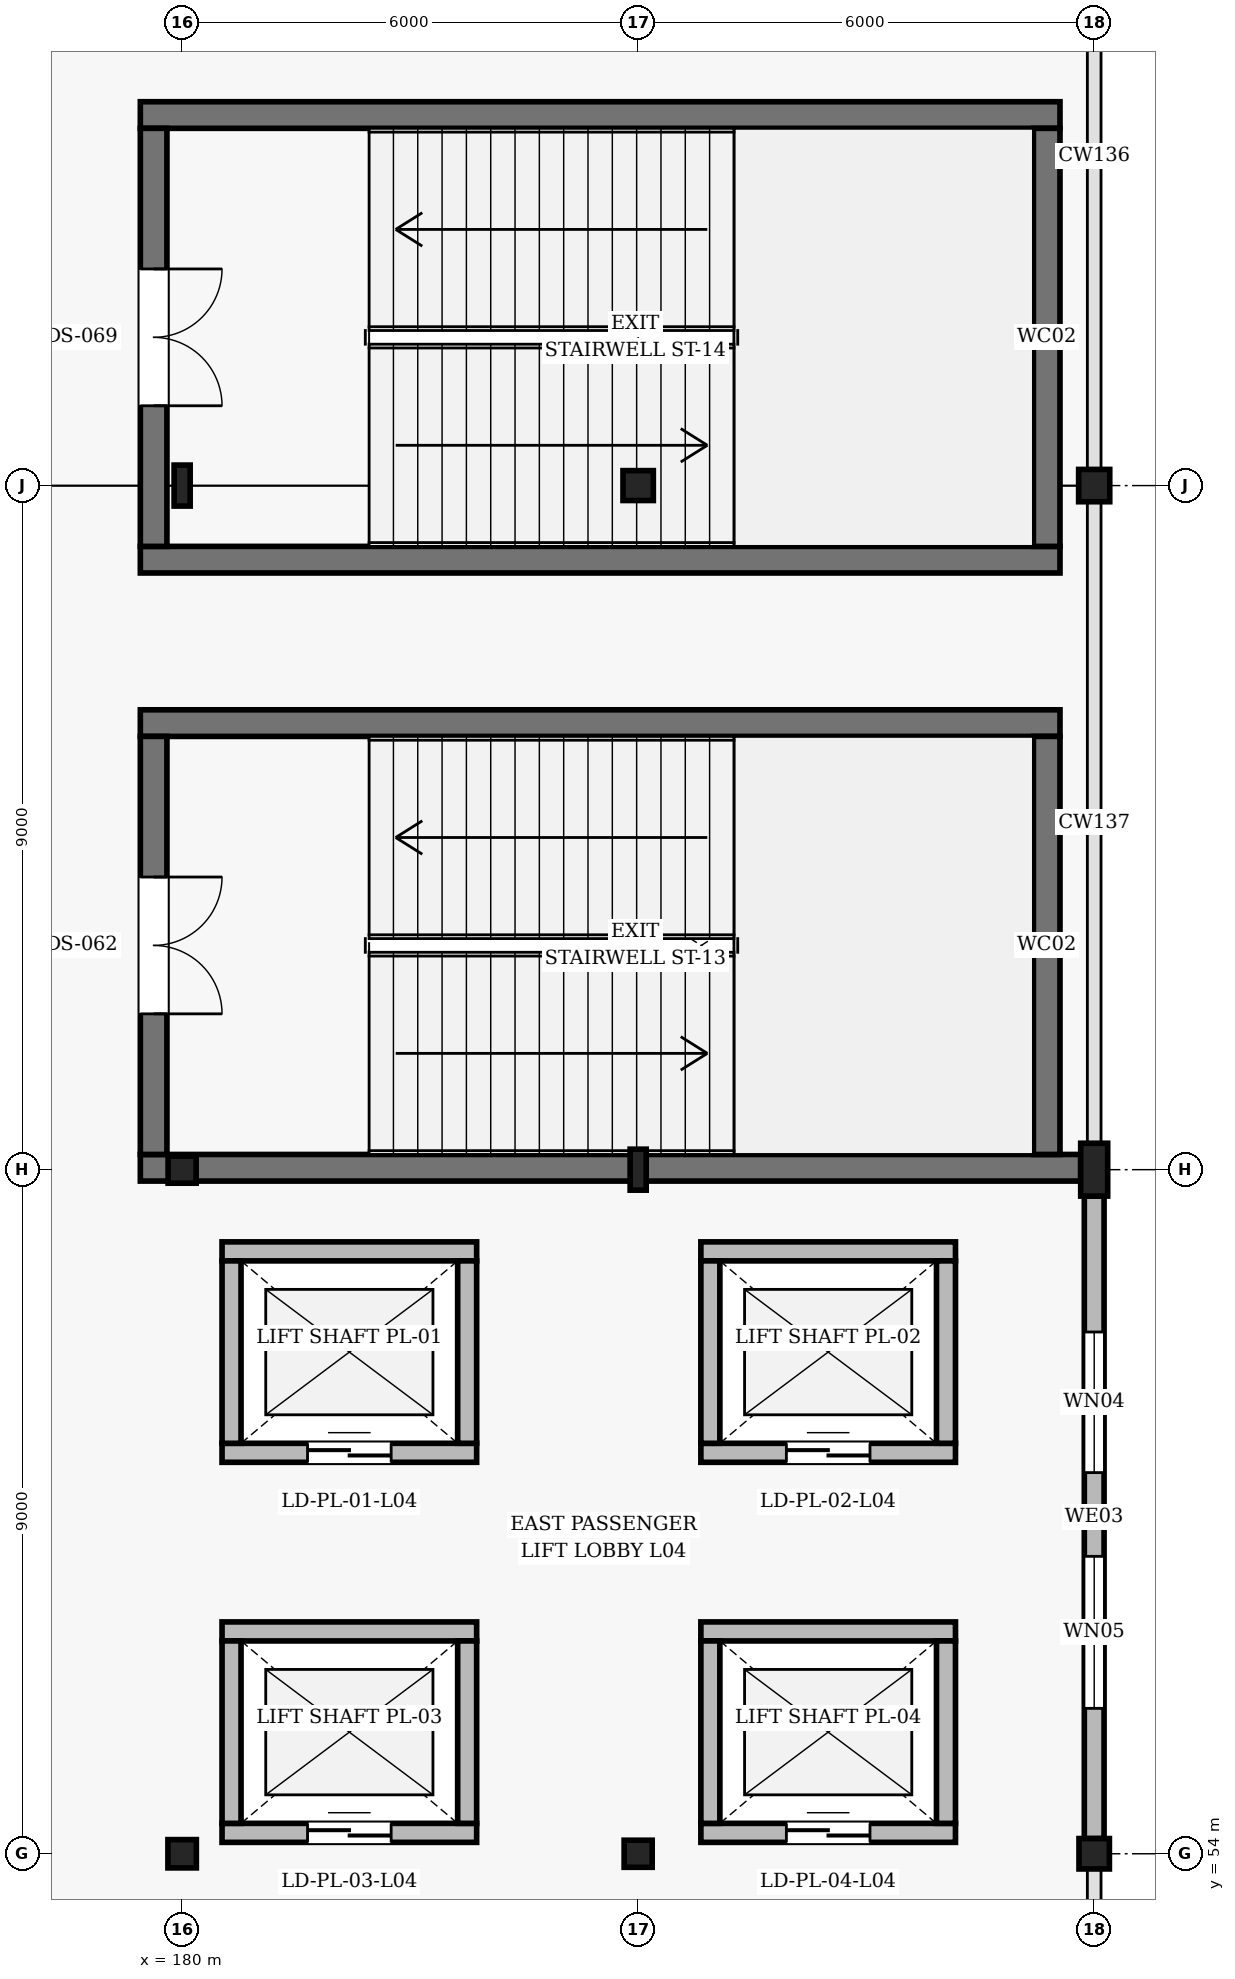
"""IFC4 building model, lengths in metres.
Left out: names, types, materials, properties, quantities, classifications, styles, units other than length and angle.
Written with IfcOpenShell. Run it as: python <this file> out.ifc"""

import sys

from ifc_helpers import new_model, si_unit, direction, frame, frame_2d, origin, origin_2d, place, context, subcontext, project, spatial, rectangle, hollow_rectangle, i_section, extrude, element, fill, save


model = new_model("IFC4")
c1 = context("Model", 3, precision=1e-05, world=origin(), true_north=direction((0.0, 1.0)))
c2 = subcontext(c1, "Body", "Model", "MODEL_VIEW")
j1 = project(units=[si_unit("LENGTHUNIT", "METRE"), si_unit("PLANEANGLEUNIT", "RADIAN")], contexts=[c1])
p1 = place(None, origin())
s1 = spatial("IfcSite", under=j1, at=p1, CompositionType="ELEMENT")
p2 = place(p1, origin())
s2 = spatial("IfcBuilding", under=s1, at=p2, CompositionType="ELEMENT")
p3 = place(p2, frame((0.0, 0.0, 20.4)))
s3 = spatial("IfcBuildingStorey", under=s2, at=p3, CompositionType="ELEMENT", Elevation=20.4)
p4 = place(p3, frame((180.0, 54.0, 0.0), z_axis=(0.0, 0.0, 1.0), x_axis=(1.0, 0.0, 0.0)))
e1 = element("IfcColumn", 1, at=p4, inside=s3, PredefinedType="COLUMN", context=c2, shape_type="SweptSolid", body=[
    extrude(i_section(OverallWidth=0.374, OverallDepth=0.372, WebThickness=0.016, FlangeThickness=0.026, FilletRadius=0.016, at=origin_2d()), origin(), (0.0, 0.0, 1.0), 4.8),
])
p5 = place(p3, frame((180.0, 63.0, 0.0), z_axis=(0.0, 0.0, 1.0), x_axis=(1.0, 0.0, 0.0)))
e2 = element("IfcColumn", 2, at=p5, inside=s3, PredefinedType="COLUMN", context=c2, shape_type="SweptSolid", body=[
    extrude(i_section(OverallWidth=0.369, OverallDepth=0.356, WebThickness=0.011, FlangeThickness=0.018, FilletRadius=0.015, at=origin_2d()), origin(), (0.0, 0.0, 1.0), 4.8),
])
p6 = place(p3, frame((180.0, 72.0, 0.0), z_axis=(0.0, 0.0, 1.0), x_axis=(1.0, 0.0, 0.0)))
e3 = element("IfcColumn", 3, at=p6, inside=s3, PredefinedType="COLUMN", context=c2, shape_type="SweptSolid", body=[
    extrude(i_section(OverallWidth=0.211, OverallDepth=0.539, WebThickness=0.012, FlangeThickness=0.019, FilletRadius=0.014, at=origin_2d()), origin(), (0.0, 0.0, 1.0), 4.8),
])
p7 = place(p3, frame((186.0, 54.0, 0.0), z_axis=(0.0, 0.0, 1.0), x_axis=(1.0, 0.0, 0.0)))
e4 = element("IfcColumn", 4, at=p7, inside=s3, PredefinedType="COLUMN", context=c2, shape_type="SweptSolid", body=[
    extrude(i_section(OverallWidth=0.369, OverallDepth=0.356, WebThickness=0.011, FlangeThickness=0.018, FilletRadius=0.015, at=origin_2d()), origin(), (0.0, 0.0, 1.0), 4.8),
])
p8 = place(p3, frame((186.0, 63.0, 0.0), z_axis=(0.0, 0.0, 1.0), x_axis=(1.0, 0.0, 0.0)))
e5 = element("IfcColumn", 5, at=p8, inside=s3, PredefinedType="COLUMN", context=c2, shape_type="SweptSolid", body=[
    extrude(i_section(OverallWidth=0.211, OverallDepth=0.539, WebThickness=0.012, FlangeThickness=0.019, FilletRadius=0.014, at=origin_2d()), origin(), (0.0, 0.0, 1.0), 4.8),
])
p9 = place(p3, frame((186.0, 72.0, 0.0), z_axis=(0.0, 0.0, 1.0), x_axis=(1.0, 0.0, 0.0)))
e6 = element("IfcColumn", 6, at=p9, inside=s3, PredefinedType="COLUMN", context=c2, shape_type="SweptSolid", body=[
    extrude(i_section(OverallWidth=0.399, OverallDepth=0.393, WebThickness=0.023, FlangeThickness=0.037, FilletRadius=0.018, at=origin_2d()), origin(), (0.0, 0.0, 1.0), 4.8),
])
p10 = place(p3, frame((192.0, 54.0, 0.0), z_axis=(0.0, 0.0, 1.0), x_axis=(1.0, 0.0, 0.0)))
e7 = element("IfcColumn", 7, at=p10, inside=s3, PredefinedType="COLUMN", context=c2, shape_type="SweptSolid", body=[
    extrude(hollow_rectangle(XDim=0.4, YDim=0.4, WallThickness=0.016, InnerFilletRadius=0.016, OuterFilletRadius=0.032, at=origin_2d()), origin(), (0.0, 0.0, 1.0), 4.8),
])
p11 = place(p3, frame((192.0, 63.0, 0.0), z_axis=(0.0, 0.0, 1.0), x_axis=(1.0, 0.0, 0.0)))
e8 = element("IfcColumn", 8, at=p11, inside=s3, PredefinedType="COLUMN", context=c2, shape_type="SweptSolid", body=[
    extrude(i_section(OverallWidth=0.355, OverallDepth=0.695, WebThickness=0.015, FlangeThickness=0.025, FilletRadius=0.018, at=origin_2d()), origin(), (0.0, 0.0, 1.0), 4.8),
])
p12 = place(p3, frame((192.0, 72.0, 0.0), z_axis=(0.0, 0.0, 1.0), x_axis=(1.0, 0.0, 0.0)))
e9 = element("IfcColumn", 9, at=p12, inside=s3, PredefinedType="COLUMN", context=c2, shape_type="SweptSolid", body=[
    extrude(i_section(OverallWidth=0.409, OverallDepth=0.425, WebThickness=0.031, FlangeThickness=0.049, FilletRadius=0.02, at=origin_2d()), origin(), (0.0, 0.0, 1.0), 4.8),
])
p13 = place(p3, frame((192.0, 62.653, 0.0), z_axis=(0.0, 0.0, 1.0), x_axis=(0.0, -1.0, 0.0)))
e10 = element("IfcWall", 10, at=p13, inside=s3, PredefinedType="SOLIDWALL", context=c2, shape_type="SweptSolid", body=[
    extrude(rectangle(XDim=8.453, YDim=0.26, at=frame_2d((4.226, 0.0))), origin(), (0.0, 0.0, 1.0), 4.245),
])
p14 = place(p13, frame((1.788, 0.0, 0.95)))
e11 = element("IfcOpeningElement", 11, at=p14, cuts=e10, PredefinedType="OPENING", context=c2, shape_type="SweptSolid", body=[
    extrude(rectangle(XDim=1.85, YDim=1.8, at=frame_2d((0.925, 0.9))), frame((0.0, 0.14, 0.0), z_axis=(0.0, -1.0, 0.0), x_axis=(1.0, 0.0, 0.0)), (0.0, 0.0, 1.0), 0.28),
])
p15 = place(p13, frame((4.74, 0.0, 0.95)))
e12 = element("IfcOpeningElement", 12, at=p15, cuts=e10, PredefinedType="OPENING", context=c2, shape_type="SweptSolid", body=[
    extrude(rectangle(XDim=2.0, YDim=1.85, at=frame_2d((1.0, 0.925))), frame((0.0, 0.14, 0.0), z_axis=(0.0, -1.0, 0.0), x_axis=(1.0, 0.0, 0.0)), (0.0, 0.0, 1.0), 0.28),
])
p16 = place(p3, frame((179.45, 63.025, 0.0), z_axis=(0.0, 0.0, 1.0), x_axis=(1.0, 0.0, 0.0)))
e13 = element("IfcWall", 13, at=p16, inside=s3, PredefinedType="SHEAR", context=c2, shape_type="SweptSolid", body=[
    extrude(rectangle(XDim=12.373, YDim=0.35, at=frame_2d((6.186, 0.0))), origin(), (0.0, 0.0, 1.0), 4.56),
])
p17 = place(p3, frame((191.55, 68.875, 0.0), z_axis=(0.0, 0.0, 1.0), x_axis=(-1.0, 0.0, 0.0)))
e14 = element("IfcWall", 14, at=p17, inside=s3, PredefinedType="SHEAR", context=c2, shape_type="SweptSolid", body=[
    extrude(rectangle(XDim=12.1, YDim=0.35, at=frame_2d((6.05, 0.0))), origin(), (0.0, 0.0, 1.0), 4.56),
])
p18 = place(p3, frame((179.625, 68.7, 0.0), z_axis=(0.0, 0.0, 1.0), x_axis=(0.0, -1.0, 0.0)))
e15 = element("IfcWall", 15, at=p18, inside=s3, PredefinedType="SHEAR", context=c2, shape_type="SweptSolid", body=[
    extrude(rectangle(XDim=5.5, YDim=0.35, at=frame_2d((2.75, 0.0))), origin(), (0.0, 0.0, 1.0), 4.56),
])
p19 = place(p18, frame((1.85, 0.0, 0.0)))
e16 = element("IfcOpeningElement", 16, at=p19, cuts=e15, PredefinedType="OPENING", context=c2, shape_type="SweptSolid", body=[
    extrude(rectangle(XDim=1.8, YDim=2.2, at=frame_2d((0.9, 1.1))), frame((0.0, 0.185, 0.0), z_axis=(0.0, -1.0, 0.0), x_axis=(1.0, 0.0, 0.0)), (0.0, 0.0, 1.0), 0.37),
])
p20 = place(p3, frame((191.375, 63.2, 0.0), z_axis=(0.0, 0.0, 1.0), x_axis=(0.0, 1.0, 0.0)))
e17 = element("IfcWall", 17, at=p20, inside=s3, PredefinedType="SHEAR", context=c2, shape_type="SweptSolid", body=[
    extrude(rectangle(XDim=5.5, YDim=0.35, at=frame_2d((2.75, 0.0))), origin(), (0.0, 0.0, 1.0), 4.56),
])
for number, where, z_axis, x_axis in (
    (18, (179.45, 71.025, 0.0), (0.0, 0.0, 1.0), (1.0, 0.0, 0.0)),
    (19, (191.55, 76.875, 0.0), (0.0, 0.0, 1.0), (-1.0, 0.0, 0.0)),
):
    element("IfcWall", number, at=place(p3, frame(where, z_axis=z_axis, x_axis=x_axis)), inside=s3, PredefinedType="SHEAR", context=c2, shape_type="SweptSolid", body=[
        extrude(rectangle(XDim=12.1, YDim=0.35, at=frame_2d((6.05, 0.0))), origin(), (0.0, 0.0, 1.0), 4.56),
    ])
p21 = place(p3, frame((179.625, 76.7, 0.0), z_axis=(0.0, 0.0, 1.0), x_axis=(0.0, -1.0, 0.0)))
e20 = element("IfcWall", 20, at=p21, inside=s3, PredefinedType="SHEAR", context=c2, shape_type="SweptSolid", body=[
    extrude(rectangle(XDim=5.5, YDim=0.35, at=frame_2d((2.75, 0.0))), origin(), (0.0, 0.0, 1.0), 4.56),
])
p22 = place(p21, frame((1.85, 0.0, 0.0)))
e21 = element("IfcOpeningElement", 21, at=p22, cuts=e20, PredefinedType="OPENING", context=c2, shape_type="SweptSolid", body=[
    extrude(rectangle(XDim=1.8, YDim=2.2, at=frame_2d((0.9, 1.1))), frame((0.0, 0.185, 0.0), z_axis=(0.0, -1.0, 0.0), x_axis=(1.0, 0.0, 0.0)), (0.0, 0.0, 1.0), 0.37),
])
p23 = place(p3, frame((191.375, 71.2, 0.0), z_axis=(0.0, 0.0, 1.0), x_axis=(0.0, 1.0, 0.0)))
e22 = element("IfcWall", 22, at=p23, inside=s3, PredefinedType="SHEAR", context=c2, shape_type="SweptSolid", body=[
    extrude(rectangle(XDim=5.5, YDim=0.35, at=frame_2d((2.75, 0.0))), origin(), (0.0, 0.0, 1.0), 4.56),
])
p24 = place(p3, frame((180.525, 59.275, 0.0), z_axis=(0.0, 0.0, 1.0), x_axis=(1.0, 0.0, 0.0)))
e23 = element("IfcWall", 23, at=p24, inside=s3, PredefinedType="SOLIDWALL", context=c2, shape_type="SweptSolid", body=[
    extrude(rectangle(XDim=3.35, YDim=0.25, at=frame_2d((1.675, 0.0))), origin(), (0.0, 0.0, 1.0), 4.56),
])
p25 = place(p24, frame((1.125, 0.0, 0.0)))
e24 = element("IfcOpeningElement", 24, at=p25, cuts=e23, PredefinedType="OPENING", context=c2, shape_type="SweptSolid", body=[
    extrude(rectangle(XDim=1.1, YDim=2.2, at=frame_2d((0.55, 1.1))), frame((0.0, 0.135, 0.0), z_axis=(0.0, -1.0, 0.0), x_axis=(1.0, 0.0, 0.0)), (0.0, 0.0, 1.0), 0.27),
])
p26 = place(p3, frame((183.875, 61.925, 0.0), z_axis=(0.0, 0.0, 1.0), x_axis=(-1.0, 0.0, 0.0)))
e25 = element("IfcWall", 25, at=p26, inside=s3, PredefinedType="SOLIDWALL", context=c2, shape_type="SweptSolid", body=[
    extrude(rectangle(XDim=3.35, YDim=0.25, at=frame_2d((1.675, 0.0))), origin(), (0.0, 0.0, 1.0), 4.56),
])
for number, where, z_axis, x_axis in (
    (26, (180.65, 61.8, 0.0), (0.0, 0.0, 1.0), (0.0, -1.0, 0.0)),
    (27, (183.75, 59.4, 0.0), (0.0, 0.0, 1.0), (0.0, 1.0, 0.0)),
):
    element("IfcWall", number, at=place(p3, frame(where, z_axis=z_axis, x_axis=x_axis)), inside=s3, PredefinedType="SOLIDWALL", context=c2, shape_type="SweptSolid", body=[
        extrude(rectangle(XDim=2.4, YDim=0.25, at=frame_2d((1.2, 0.0))), origin(), (0.0, 0.0, 1.0), 4.56),
    ])
p27 = place(p3, frame((186.825, 59.275, 0.0), z_axis=(0.0, 0.0, 1.0), x_axis=(1.0, 0.0, 0.0)))
e28 = element("IfcWall", 28, at=p27, inside=s3, PredefinedType="SOLIDWALL", context=c2, shape_type="SweptSolid", body=[
    extrude(rectangle(XDim=3.35, YDim=0.25, at=frame_2d((1.675, 0.0))), origin(), (0.0, 0.0, 1.0), 4.56),
])
p28 = place(p27, frame((1.125, 0.0, 0.0)))
e29 = element("IfcOpeningElement", 29, at=p28, cuts=e28, PredefinedType="OPENING", context=c2, shape_type="SweptSolid", body=[
    extrude(rectangle(XDim=1.1, YDim=2.2, at=frame_2d((0.55, 1.1))), frame((0.0, 0.135, 0.0), z_axis=(0.0, -1.0, 0.0), x_axis=(1.0, 0.0, 0.0)), (0.0, 0.0, 1.0), 0.27),
])
p29 = place(p3, frame((190.175, 61.925, 0.0), z_axis=(0.0, 0.0, 1.0), x_axis=(-1.0, 0.0, 0.0)))
e30 = element("IfcWall", 30, at=p29, inside=s3, PredefinedType="SOLIDWALL", context=c2, shape_type="SweptSolid", body=[
    extrude(rectangle(XDim=3.35, YDim=0.25, at=frame_2d((1.675, 0.0))), origin(), (0.0, 0.0, 1.0), 4.56),
])
for number, where, z_axis, x_axis in (
    (31, (186.95, 61.8, 0.0), (0.0, 0.0, 1.0), (0.0, -1.0, 0.0)),
    (32, (190.05, 59.4, 0.0), (0.0, 0.0, 1.0), (0.0, 1.0, 0.0)),
):
    element("IfcWall", number, at=place(p3, frame(where, z_axis=z_axis, x_axis=x_axis)), inside=s3, PredefinedType="SOLIDWALL", context=c2, shape_type="SweptSolid", body=[
        extrude(rectangle(XDim=2.4, YDim=0.25, at=frame_2d((1.2, 0.0))), origin(), (0.0, 0.0, 1.0), 4.56),
    ])
p30 = place(p3, frame((180.525, 54.275, 0.0), z_axis=(0.0, 0.0, 1.0), x_axis=(1.0, 0.0, 0.0)))
e33 = element("IfcWall", 33, at=p30, inside=s3, PredefinedType="SOLIDWALL", context=c2, shape_type="SweptSolid", body=[
    extrude(rectangle(XDim=3.35, YDim=0.25, at=frame_2d((1.675, 0.0))), origin(), (0.0, 0.0, 1.0), 3.861),
])
p31 = place(p30, frame((1.125, 0.0, 0.0)))
e34 = element("IfcOpeningElement", 34, at=p31, cuts=e33, PredefinedType="OPENING", context=c2, shape_type="SweptSolid", body=[
    extrude(rectangle(XDim=1.1, YDim=2.2, at=frame_2d((0.55, 1.1))), frame((0.0, 0.135, 0.0), z_axis=(0.0, -1.0, 0.0), x_axis=(1.0, 0.0, 0.0)), (0.0, 0.0, 1.0), 0.27),
])
p32 = place(p3, frame((183.875, 56.925, 0.0), z_axis=(0.0, 0.0, 1.0), x_axis=(-1.0, 0.0, 0.0)))
e35 = element("IfcWall", 35, at=p32, inside=s3, PredefinedType="SOLIDWALL", context=c2, shape_type="SweptSolid", body=[
    extrude(rectangle(XDim=3.35, YDim=0.25, at=frame_2d((1.675, 0.0))), origin(), (0.0, 0.0, 1.0), 4.237),
])
for number, where, z_axis, x_axis in (
    (36, (180.65, 56.8, 0.0), (0.0, 0.0, 1.0), (0.0, -1.0, 0.0)),
    (37, (183.75, 54.4, 0.0), (0.0, 0.0, 1.0), (0.0, 1.0, 0.0)),
):
    element("IfcWall", number, at=place(p3, frame(where, z_axis=z_axis, x_axis=x_axis)), inside=s3, PredefinedType="SOLIDWALL", context=c2, shape_type="SweptSolid", body=[
        extrude(rectangle(XDim=2.4, YDim=0.25, at=frame_2d((1.2, 0.0))), origin(), (0.0, 0.0, 1.0), 3.861),
    ])
p33 = place(p3, frame((186.825, 54.275, 0.0), z_axis=(0.0, 0.0, 1.0), x_axis=(1.0, 0.0, 0.0)))
e38 = element("IfcWall", 38, at=p33, inside=s3, PredefinedType="SOLIDWALL", context=c2, shape_type="SweptSolid", body=[
    extrude(rectangle(XDim=3.35, YDim=0.25, at=frame_2d((1.675, 0.0))), origin(), (0.0, 0.0, 1.0), 3.934),
])
p34 = place(p33, frame((1.125, 0.0, 0.0)))
e39 = element("IfcOpeningElement", 39, at=p34, cuts=e38, PredefinedType="OPENING", context=c2, shape_type="SweptSolid", body=[
    extrude(rectangle(XDim=1.1, YDim=2.2, at=frame_2d((0.55, 1.1))), frame((0.0, 0.135, 0.0), z_axis=(0.0, -1.0, 0.0), x_axis=(1.0, 0.0, 0.0)), (0.0, 0.0, 1.0), 0.27),
])
p35 = place(p3, frame((190.175, 56.925, 0.0), z_axis=(0.0, 0.0, 1.0), x_axis=(-1.0, 0.0, 0.0)))
e40 = element("IfcWall", 40, at=p35, inside=s3, PredefinedType="SOLIDWALL", context=c2, shape_type="SweptSolid", body=[
    extrude(rectangle(XDim=3.35, YDim=0.25, at=frame_2d((1.675, 0.0))), origin(), (0.0, 0.0, 1.0), 3.937),
])
for number, where, z_axis, x_axis in (
    (41, (186.95, 56.8, 0.0), (0.0, 0.0, 1.0), (0.0, -1.0, 0.0)),
    (42, (190.05, 54.4, 0.0), (0.0, 0.0, 1.0), (0.0, 1.0, 0.0)),
):
    element("IfcWall", number, at=place(p3, frame(where, z_axis=z_axis, x_axis=x_axis)), inside=s3, PredefinedType="SOLIDWALL", context=c2, shape_type="SweptSolid", body=[
        extrude(rectangle(XDim=2.4, YDim=0.25, at=frame_2d((1.2, 0.0))), origin(), (0.0, 0.0, 1.0), 3.934),
    ])
p36 = place(p14, origin())
e43 = element("IfcWindow", 43, at=p36, inside=s3, PartitioningType="SINGLE_PANEL", PredefinedType="WINDOW", context=c2, shape_type="SweptSolid", body=[
    extrude(rectangle(XDim=1.85, YDim=1.8, at=frame_2d((0.925, 0.9))), frame((0.0, 0.03, 0.0), z_axis=(0.0, -1.0, 0.0), x_axis=(1.0, 0.0, 0.0)), (0.0, 0.0, 1.0), 0.06),
])
fill(e11, e43)
p37 = place(p15, origin())
e44 = element("IfcWindow", 44, at=p37, inside=s3, PartitioningType="SINGLE_PANEL", PredefinedType="WINDOW", context=c2, shape_type="SweptSolid", body=[
    extrude(rectangle(XDim=2.0, YDim=1.85, at=frame_2d((1.0, 0.925))), frame((0.0, 0.03, 0.0), z_axis=(0.0, -1.0, 0.0), x_axis=(1.0, 0.0, 0.0)), (0.0, 0.0, 1.0), 0.06),
])
fill(e12, e44)
p38 = place(p19, origin())
e45 = element("IfcDoor", 45, at=p38, inside=s3, OperationType="DOUBLE_DOOR_SINGLE_SWING", PredefinedType="DOOR", context=c2, shape_type="SweptSolid", body=[
    extrude(rectangle(XDim=1.8, YDim=2.2, at=frame_2d((0.9, 1.1))), frame((0.0, 0.025, 0.0), z_axis=(0.0, -1.0, 0.0), x_axis=(1.0, 0.0, 0.0)), (0.0, 0.0, 1.0), 0.05),
])
fill(e16, e45)
p39 = place(p22, origin())
e46 = element("IfcDoor", 46, at=p39, inside=s3, OperationType="DOUBLE_DOOR_SINGLE_SWING", PredefinedType="DOOR", context=c2, shape_type="SweptSolid", body=[
    extrude(rectangle(XDim=1.8, YDim=2.2, at=frame_2d((0.9, 1.1))), frame((0.0, 0.025, 0.0), z_axis=(0.0, -1.0, 0.0), x_axis=(1.0, 0.0, 0.0)), (0.0, 0.0, 1.0), 0.05),
])
fill(e21, e46)
p40 = place(p25, origin())
e47 = element("IfcDoor", 47, at=p40, inside=s3, OperationType="DOUBLE_DOOR_SLIDING", PredefinedType="DOOR", context=c2, shape_type="SweptSolid", body=[
    extrude(rectangle(XDim=1.1, YDim=2.2, at=frame_2d((0.55, 1.1))), frame((0.0, 0.025, 0.0), z_axis=(0.0, -1.0, 0.0), x_axis=(1.0, 0.0, 0.0)), (0.0, 0.0, 1.0), 0.05),
])
fill(e24, e47)
p41 = place(p28, origin())
e48 = element("IfcDoor", 48, at=p41, inside=s3, OperationType="DOUBLE_DOOR_SLIDING", PredefinedType="DOOR", context=c2, shape_type="SweptSolid", body=[
    extrude(rectangle(XDim=1.1, YDim=2.2, at=frame_2d((0.55, 1.1))), frame((0.0, 0.025, 0.0), z_axis=(0.0, -1.0, 0.0), x_axis=(1.0, 0.0, 0.0)), (0.0, 0.0, 1.0), 0.05),
])
fill(e29, e48)
p42 = place(p31, origin())
e49 = element("IfcDoor", 49, at=p42, inside=s3, OperationType="DOUBLE_DOOR_SLIDING", PredefinedType="DOOR", context=c2, shape_type="SweptSolid", body=[
    extrude(rectangle(XDim=1.1, YDim=2.2, at=frame_2d((0.55, 1.1))), frame((0.0, 0.025, 0.0), z_axis=(0.0, -1.0, 0.0), x_axis=(1.0, 0.0, 0.0)), (0.0, 0.0, 1.0), 0.05),
])
fill(e34, e49)
p43 = place(p34, origin())
e50 = element("IfcDoor", 50, at=p43, inside=s3, OperationType="DOUBLE_DOOR_SLIDING", PredefinedType="DOOR", context=c2, shape_type="SweptSolid", body=[
    extrude(rectangle(XDim=1.1, YDim=2.2, at=frame_2d((0.55, 1.1))), frame((0.0, 0.025, 0.0), z_axis=(0.0, -1.0, 0.0), x_axis=(1.0, 0.0, 0.0)), (0.0, 0.0, 1.0), 0.05),
])
fill(e39, e50)
save(model, sys.argv[1])
